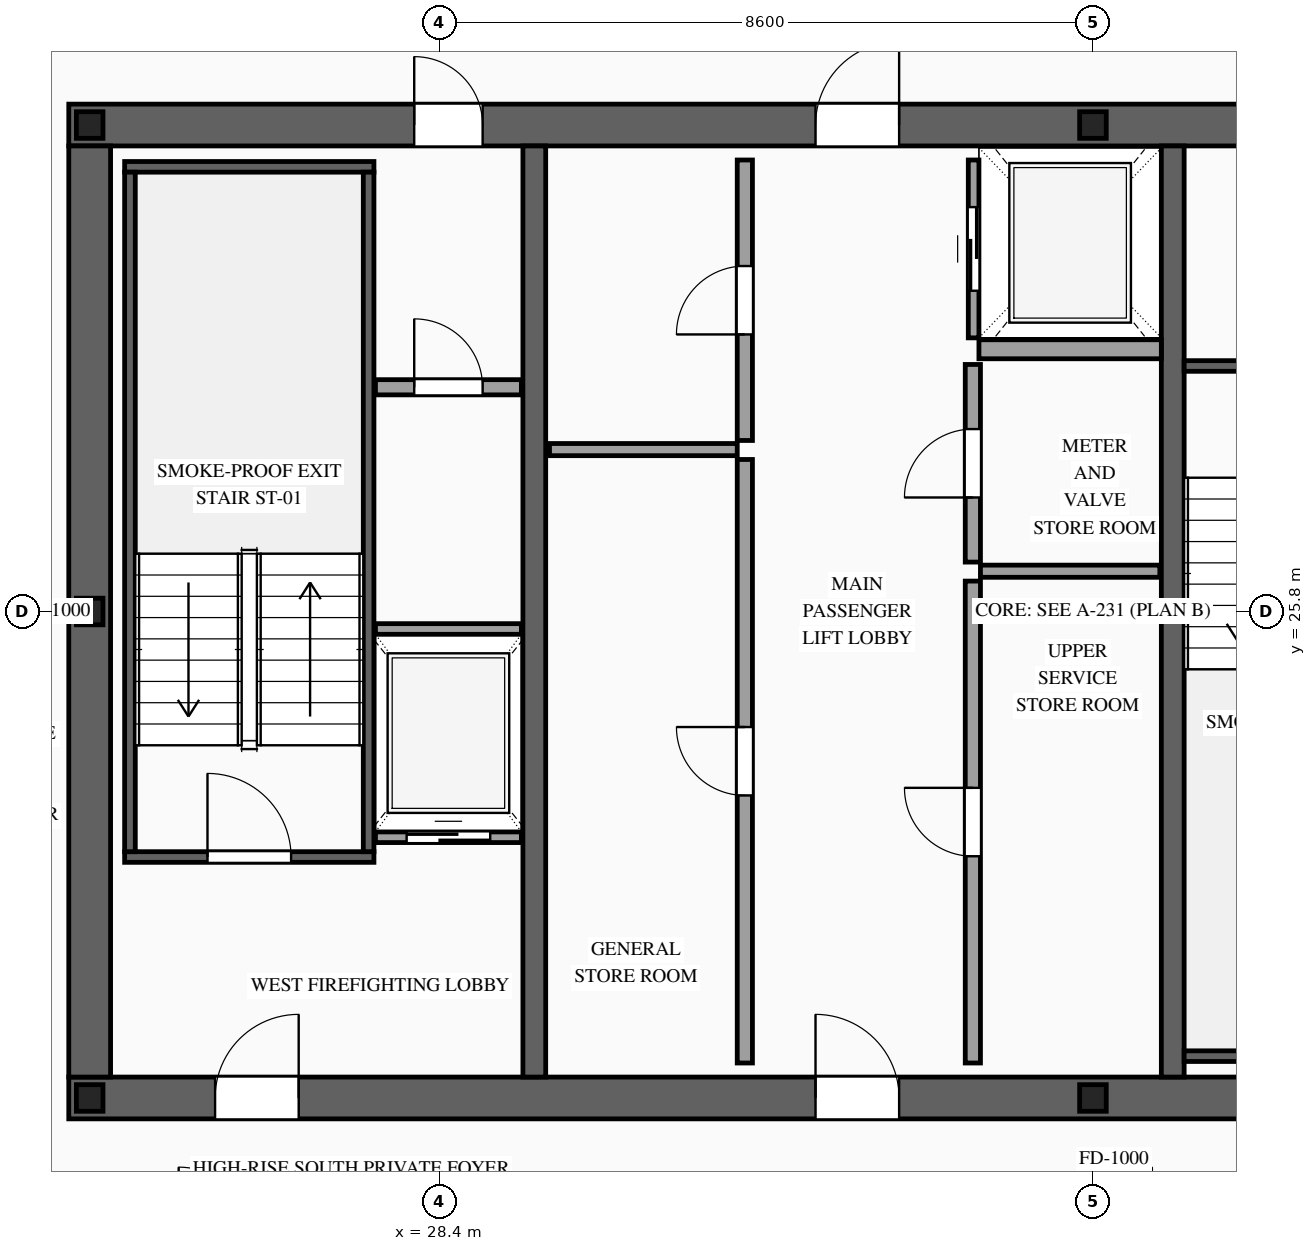
"""IFC4 building model, lengths in metres.
Left out: names, types, materials, properties, quantities, classifications, styles, units other than length and angle.
Written with IfcOpenShell. Run it as: python <this file> out.ifc"""

import sys

from ifc_helpers import new_model, si_unit, direction, frame, frame_2d, origin, origin_2d, place, context, subcontext, project, spatial, rectangle, i_section, extrude, source, transform, mapped, element, fill, save


model = new_model("IFC4")
c1 = context("Model", 3, precision=1e-05, world=origin(), true_north=direction((0.0, 1.0)))
c2 = subcontext(c1, "Body", "Model", "MODEL_VIEW")
j1 = project(units=[si_unit("LENGTHUNIT", "METRE"), si_unit("PLANEANGLEUNIT", "RADIAN")], contexts=[c1])
p1 = place(None, origin())
s1 = spatial("IfcSite", under=j1, at=p1, CompositionType="ELEMENT")
p2 = place(p1, origin())
s2 = spatial("IfcBuilding", under=s1, at=p2, CompositionType="ELEMENT")
p3 = place(p2, frame((0.0, 0.0, 271.6)))
s3 = spatial("IfcBuildingStorey", under=s2, at=p3, CompositionType="ELEMENT", Elevation=271.6)
p4 = place(p3, frame((23.525, 19.4, 0.0), z_axis=(0.0, 0.0, 1.0), x_axis=(1.0, 0.0, 0.0)))
e1 = element("IfcWall", 1, at=p4, inside=s3, PredefinedType="SHEAR", context=c2, shape_type="SweptSolid", body=[
    extrude(rectangle(XDim=26.95, YDim=0.55, at=frame_2d((13.475, 0.0))), origin(), (0.0, 0.0, 1.0), 3.5),
])
p5 = place(p4, frame((1.925, 0.0, 0.0)))
e2 = element("IfcOpeningElement", 2, at=p5, cuts=e1, PredefinedType="OPENING", context=c2, shape_type="SweptSolid", body=[
    extrude(rectangle(XDim=1.1, YDim=2.2, at=frame_2d((0.55, 1.1))), frame((0.0, 0.29, 0.0), z_axis=(0.0, -1.0, 0.0), x_axis=(1.0, 0.0, 0.0)), (0.0, 0.0, 1.0), 0.58),
])
p6 = place(p4, frame((9.825, 0.0, 0.0)))
e3 = element("IfcOpeningElement", 3, at=p6, cuts=e1, PredefinedType="OPENING", context=c2, shape_type="SweptSolid", body=[
    extrude(rectangle(XDim=1.1, YDim=2.2, at=frame_2d((0.55, 1.1))), frame((0.0, 0.29, 0.0), z_axis=(0.0, -1.0, 0.0), x_axis=(1.0, 0.0, 0.0)), (0.0, 0.0, 1.0), 0.58),
])
p7 = place(p4, frame((23.025, 0.0, 0.0)))
e4 = element("IfcOpeningElement", 4, at=p7, cuts=e1, PredefinedType="OPENING", context=c2, shape_type="SweptSolid", body=[
    extrude(rectangle(XDim=1.1, YDim=2.2, at=frame_2d((0.55, 1.1))), frame((0.0, 0.29, 0.0), z_axis=(0.0, -1.0, 0.0), x_axis=(1.0, 0.0, 0.0)), (0.0, 0.0, 1.0), 0.58),
])
p8 = place(p4, frame((19.645, 0.0, 0.0)))
e5 = element("IfcOpeningElement", 5, at=p8, cuts=e1, PredefinedType="OPENING", context=c2, shape_type="SweptSolid", body=[
    extrude(rectangle(XDim=0.9, YDim=2.15, at=frame_2d((0.45, 1.075))), frame((0.0, 0.29, 0.0), z_axis=(0.0, -1.0, 0.0), x_axis=(1.0, 0.0, 0.0)), (0.0, 0.0, 1.0), 0.58),
])
p9 = place(p4, frame((18.205, 0.0, 0.0)))
e6 = element("IfcOpeningElement", 6, at=p9, cuts=e1, PredefinedType="OPENING", context=c2, shape_type="SweptSolid", body=[
    extrude(rectangle(XDim=0.9, YDim=2.15, at=frame_2d((0.45, 1.075))), frame((0.0, 0.29, 0.0), z_axis=(0.0, -1.0, 0.0), x_axis=(1.0, 0.0, 0.0)), (0.0, 0.0, 1.0), 0.58),
])
p10 = place(p3, frame((23.525, 32.2, 0.0), z_axis=(0.0, 0.0, 1.0), x_axis=(1.0, 0.0, 0.0)))
e7 = element("IfcWall", 7, at=p10, inside=s3, PredefinedType="SHEAR", context=c2, shape_type="SweptSolid", body=[
    extrude(rectangle(XDim=26.95, YDim=0.55, at=frame_2d((13.475, 0.0))), origin(), (0.0, 0.0, 1.0), 3.5),
])
p11 = place(p10, frame((4.545, 0.0, 0.0)))
e8 = element("IfcOpeningElement", 8, at=p11, cuts=e7, PredefinedType="OPENING", context=c2, shape_type="SweptSolid", body=[
    extrude(rectangle(XDim=0.9, YDim=2.15, at=frame_2d((0.45, 1.075))), frame((0.0, 0.29, 0.0), z_axis=(0.0, -1.0, 0.0), x_axis=(1.0, 0.0, 0.0)), (0.0, 0.0, 1.0), 0.58),
])
p12 = place(p10, frame((9.825, 0.0, 0.0)))
e9 = element("IfcOpeningElement", 9, at=p12, cuts=e7, PredefinedType="OPENING", context=c2, shape_type="SweptSolid", body=[
    extrude(rectangle(XDim=1.1, YDim=2.2, at=frame_2d((0.55, 1.1))), frame((0.0, 0.29, 0.0), z_axis=(0.0, -1.0, 0.0), x_axis=(1.0, 0.0, 0.0)), (0.0, 0.0, 1.0), 0.58),
])
p13 = place(p10, frame((15.675, 0.0, 0.0)))
e10 = element("IfcOpeningElement", 10, at=p13, cuts=e7, PredefinedType="OPENING", context=c2, shape_type="SweptSolid", body=[
    extrude(rectangle(XDim=1.1, YDim=2.2, at=frame_2d((0.55, 1.1))), frame((0.0, 0.29, 0.0), z_axis=(0.0, -1.0, 0.0), x_axis=(1.0, 0.0, 0.0)), (0.0, 0.0, 1.0), 0.58),
])
p14 = place(p10, frame((18.775, 0.0, 0.0)))
e11 = element("IfcOpeningElement", 11, at=p14, cuts=e7, PredefinedType="OPENING", context=c2, shape_type="SweptSolid", body=[
    extrude(rectangle(XDim=1.1, YDim=2.2, at=frame_2d((0.55, 1.1))), frame((0.0, 0.29, 0.0), z_axis=(0.0, -1.0, 0.0), x_axis=(1.0, 0.0, 0.0)), (0.0, 0.0, 1.0), 0.58),
])
m1 = source(origin(), c2, "Body", "SweptSolid", [
    extrude(rectangle(XDim=12.25, YDim=0.55, at=frame_2d((6.125, 0.0))), origin(), (0.0, 0.0, 1.0), 3.5),
])
p15 = place(p3, frame((23.8, 19.675, 0.0), z_axis=(0.0, 0.0, 1.0), x_axis=(0.0, 1.0, 0.0)))
e12 = element("IfcWall", 12, at=p15, inside=s3, PredefinedType="SHEAR", context=c2, shape_type="MappedRepresentation", body=[
    mapped(m1, transform((0.0, 0.0, 0.0), scale=1.0)),
])
m2 = source(origin(), c2, "Body", "SweptSolid", [
    extrude(rectangle(XDim=12.25, YDim=0.3, at=frame_2d((6.125, 0.0))), origin(), (0.0, 0.0, 1.0), 3.5),
])
for number, where, z_axis, x_axis in (
    (13, (29.65, 19.675, 0.0), (0.0, 0.0, 1.0), (0.0, 1.0, 0.0)),
    (14, (38.05, 19.675, 0.0), (0.0, 0.0, 1.0), (0.0, 1.0, 0.0)),
):
    element("IfcWall", number, at=place(p3, frame(where, z_axis=z_axis, x_axis=x_axis)), inside=s3, PredefinedType="SOLIDWALL", context=c2, shape_type="MappedRepresentation", body=[
        mapped(m2, transform((0.0, 0.0, 0.0), scale=1.0)),
    ])
m3 = source(origin(), c2, "Body", "SweptSolid", [
    extrude(i_section(OverallWidth=0.35, OverallDepth=0.35, WebThickness=0.012, FlangeThickness=0.019, at=origin_2d()), origin(), (0.0, 0.0, 1.0), 3.5),
])
for number, where, z_axis, x_axis in (
    (15, (23.8, 19.4, 0.0), (0.0, 0.0, 1.0), (1.0, 0.0, 0.0)),
    (16, (37.0, 19.4, 0.0), (0.0, 0.0, 1.0), (1.0, 0.0, 0.0)),
    (17, (23.8, 25.8, 0.0), (0.0, 0.0, 1.0), (1.0, 0.0, 0.0)),
    (18, (23.8, 32.2, 0.0), (0.0, 0.0, 1.0), (1.0, 0.0, 0.0)),
    (19, (37.0, 32.2, 0.0), (0.0, 0.0, 1.0), (1.0, 0.0, 0.0)),
):
    element("IfcColumn", number, at=place(p3, frame(where, z_axis=z_axis, x_axis=x_axis)), inside=s3, PredefinedType="COLUMN", context=c2, shape_type="MappedRepresentation", body=[
        mapped(m3, transform((0.0, 0.0, 0.0), scale=1.0)),
    ])
p16 = place(p3, frame((27.56, 22.83, 0.0), z_axis=(0.0, 0.0, 1.0), x_axis=(1.0, 0.0, 0.0)))
e20 = element("IfcWall", 20, at=p16, inside=s3, PredefinedType="SOLIDWALL", context=c2, shape_type="SweptSolid", body=[
    extrude(rectangle(XDim=1.92, YDim=0.14, at=frame_2d((0.96, 0.0))), origin(), (0.0, 0.0, 1.0), 3.28),
])
p17 = place(p16, frame((0.41, 0.0, 0.0)))
e21 = element("IfcOpeningElement", 21, at=p17, cuts=e20, PredefinedType="OPENING", context=c2, shape_type="SweptSolid", body=[
    extrude(rectangle(XDim=1.1, YDim=2.2, at=frame_2d((0.55, 1.1))), frame((0.0, 0.085, 0.0), z_axis=(0.0, -1.0, 0.0), x_axis=(1.0, 0.0, 0.0)), (0.0, 0.0, 1.0), 0.17),
])
m4 = source(origin(), c2, "Body", "SweptSolid", [
    extrude(rectangle(XDim=1.92, YDim=0.14, at=frame_2d((0.96, 0.0))), origin(), (0.0, 0.0, 1.0), 3.28),
])
p18 = place(p3, frame((27.56, 25.57, 0.0), z_axis=(0.0, 0.0, 1.0), x_axis=(1.0, 0.0, 0.0)))
e22 = element("IfcWall", 22, at=p18, inside=s3, PredefinedType="SOLIDWALL", context=c2, shape_type="MappedRepresentation", body=[
    mapped(m4, transform((0.0, 0.0, 0.0), scale=1.0)),
])
p19 = place(p3, frame((35.43, 29.4, 0.0), z_axis=(0.0, 0.0, 1.0), x_axis=(0.0, 1.0, 0.0)))
e23 = element("IfcWall", 23, at=p19, inside=s3, PredefinedType="SOLIDWALL", context=c2, shape_type="SweptSolid", body=[
    extrude(rectangle(XDim=2.34, YDim=0.14, at=frame_2d((1.17, 0.0))), origin(), (0.0, 0.0, 1.0), 3.28),
])
p20 = place(p19, frame((0.62, 0.0, 0.0)))
e24 = element("IfcOpeningElement", 24, at=p20, cuts=e23, PredefinedType="OPENING", context=c2, shape_type="SweptSolid", body=[
    extrude(rectangle(XDim=1.1, YDim=2.2, at=frame_2d((0.55, 1.1))), frame((0.0, 0.085, 0.0), z_axis=(0.0, -1.0, 0.0), x_axis=(1.0, 0.0, 0.0)), (0.0, 0.0, 1.0), 0.17),
])
m5 = source(origin(), c2, "Body", "SweptSolid", [
    extrude(rectangle(XDim=2.4, YDim=0.25, at=frame_2d((1.2, 0.0))), origin(), (0.0, 0.0, 1.0), 3.28),
])
p21 = place(p3, frame((35.5, 29.25, 0.0), z_axis=(0.0, 0.0, 1.0), x_axis=(1.0, 0.0, 0.0)))
e25 = element("IfcWall", 25, at=p21, inside=s3, PredefinedType="SOLIDWALL", context=c2, shape_type="MappedRepresentation", body=[
    mapped(m5, transform((0.0, 0.0, 0.0), scale=1.0)),
])
p22 = place(p3, frame((24.26, 22.57, 0.0), z_axis=(0.0, 0.0, 1.0), x_axis=(1.0, 0.0, 0.0)))
e26 = element("IfcWall", 26, at=p22, inside=s3, PredefinedType="SOLIDWALL", context=c2, shape_type="SweptSolid", body=[
    extrude(rectangle(XDim=3.28, YDim=0.14, at=frame_2d((1.64, 0.0))), origin(), (0.0, 0.0, 1.0), 3.28),
])
p23 = place(p22, frame((1.09, 0.0, 0.0)))
e27 = element("IfcOpeningElement", 27, at=p23, cuts=e26, PredefinedType="OPENING", context=c2, shape_type="SweptSolid", body=[
    extrude(rectangle(XDim=1.1, YDim=2.2, at=frame_2d((0.55, 1.1))), frame((0.0, 0.085, 0.0), z_axis=(0.0, -1.0, 0.0), x_axis=(1.0, 0.0, 0.0)), (0.0, 0.0, 1.0), 0.17),
])
m6 = source(origin(), c2, "Body", "SweptSolid", [
    extrude(rectangle(XDim=3.28, YDim=0.14, at=frame_2d((1.64, 0.0))), origin(), (0.0, 0.0, 1.0), 3.28),
])
p24 = place(p3, frame((24.26, 31.65, 0.0), z_axis=(0.0, 0.0, 1.0), x_axis=(1.0, 0.0, 0.0)))
e28 = element("IfcWall", 28, at=p24, inside=s3, PredefinedType="SOLIDWALL", context=c2, shape_type="MappedRepresentation", body=[
    mapped(m6, transform((0.0, 0.0, 0.0), scale=1.0)),
])
m7 = source(origin(), c2, "Body", "SweptSolid", [
    extrude(rectangle(XDim=8.94, YDim=0.14, at=frame_2d((4.47, 0.0))), origin(), (0.0, 0.0, 1.0), 3.28),
])
for number, where, z_axis, x_axis in (
    (29, (24.33, 22.64, 0.0), (0.0, 0.0, 1.0), (0.0, 1.0, 0.0)),
    (30, (27.47, 22.64, 0.0), (0.0, 0.0, 1.0), (0.0, 1.0, 0.0)),
):
    element("IfcWall", number, at=place(p3, frame(where, z_axis=z_axis, x_axis=x_axis)), inside=s3, PredefinedType="SOLIDWALL", context=c2, shape_type="MappedRepresentation", body=[
        mapped(m7, transform((0.0, 0.0, 0.0), scale=1.0)),
    ])
p25 = place(p3, frame((38.2, 29.03, 0.0), z_axis=(0.0, 0.0, 1.0), x_axis=(1.0, 0.0, 0.0)))
e31 = element("IfcWall", 31, at=p25, inside=s3, PredefinedType="SOLIDWALL", context=c2, shape_type="SweptSolid", body=[
    extrude(rectangle(XDim=3.14, YDim=0.14, at=frame_2d((1.57, 0.0))), origin(), (0.0, 0.0, 1.0), 3.28),
])
p26 = place(p25, frame((1.02, 0.0, 0.0)))
e32 = element("IfcOpeningElement", 32, at=p26, cuts=e31, PredefinedType="OPENING", context=c2, shape_type="SweptSolid", body=[
    extrude(rectangle(XDim=1.1, YDim=2.2, at=frame_2d((0.55, 1.1))), frame((0.0, 0.085, 0.0), z_axis=(0.0, -1.0, 0.0), x_axis=(1.0, 0.0, 0.0)), (0.0, 0.0, 1.0), 0.17),
])
m8 = source(origin(), c2, "Body", "SweptSolid", [
    extrude(rectangle(XDim=3.14, YDim=0.14, at=frame_2d((1.57, 0.0))), origin(), (0.0, 0.0, 1.0), 3.28),
])
p27 = place(p3, frame((38.2, 19.95, 0.0), z_axis=(0.0, 0.0, 1.0), x_axis=(1.0, 0.0, 0.0)))
e33 = element("IfcWall", 33, at=p27, inside=s3, PredefinedType="SOLIDWALL", context=c2, shape_type="MappedRepresentation", body=[
    mapped(m8, transform((0.0, 0.0, 0.0), scale=1.0)),
])
p28 = place(p3, frame((27.56, 28.75, 0.0), z_axis=(0.0, 0.0, 1.0), x_axis=(1.0, 0.0, 0.0)))
e34 = element("IfcWall", 34, at=p28, inside=s3, PredefinedType="PARTITIONING", context=c2, shape_type="SweptSolid", body=[
    extrude(rectangle(XDim=1.92, YDim=0.2, at=frame_2d((0.96, 0.0))), origin(), (0.0, 0.0, 1.0), 3.28),
])
p29 = place(p28, frame((0.51, 0.0, 0.0)))
e35 = element("IfcOpeningElement", 35, at=p29, cuts=e34, PredefinedType="OPENING", context=c2, shape_type="SweptSolid", body=[
    extrude(rectangle(XDim=0.9, YDim=2.15, at=frame_2d((0.45, 1.075))), frame((0.0, 0.115, 0.0), z_axis=(0.0, -1.0, 0.0), x_axis=(1.0, 0.0, 0.0)), (0.0, 0.0, 1.0), 0.23),
])
p30 = place(p3, frame((32.42, 19.86, 0.0), z_axis=(0.0, 0.0, 1.0), x_axis=(0.0, 1.0, 0.0)))
e36 = element("IfcWall", 36, at=p30, inside=s3, PredefinedType="PARTITIONING", context=c2, shape_type="SweptSolid", body=[
    extrude(rectangle(XDim=7.94, YDim=0.2, at=frame_2d((3.97, 0.0))), origin(), (0.0, 0.0, 1.0), 3.28),
])
p31 = place(p30, frame((3.52, 0.0, 0.0)))
e37 = element("IfcOpeningElement", 37, at=p31, cuts=e36, PredefinedType="OPENING", context=c2, shape_type="SweptSolid", body=[
    extrude(rectangle(XDim=0.9, YDim=2.15, at=frame_2d((0.45, 1.075))), frame((0.0, 0.115, 0.0), z_axis=(0.0, -1.0, 0.0), x_axis=(1.0, 0.0, 0.0)), (0.0, 0.0, 1.0), 0.23),
])
p32 = place(p3, frame((32.42, 28.05, 0.0), z_axis=(0.0, 0.0, 1.0), x_axis=(0.0, 1.0, 0.0)))
e38 = element("IfcWall", 38, at=p32, inside=s3, PredefinedType="PARTITIONING", context=c2, shape_type="SweptSolid", body=[
    extrude(rectangle(XDim=3.69, YDim=0.2, at=frame_2d((1.845, 0.0))), origin(), (0.0, 0.0, 1.0), 3.28),
])
p33 = place(p32, frame((1.395, 0.0, 0.0)))
e39 = element("IfcOpeningElement", 39, at=p33, cuts=e38, PredefinedType="OPENING", context=c2, shape_type="SweptSolid", body=[
    extrude(rectangle(XDim=0.9, YDim=2.15, at=frame_2d((0.45, 1.075))), frame((0.0, 0.115, 0.0), z_axis=(0.0, -1.0, 0.0), x_axis=(1.0, 0.0, 0.0)), (0.0, 0.0, 1.0), 0.23),
])
m9 = source(origin(), c2, "Body", "SweptSolid", [
    extrude(rectangle(XDim=2.47, YDim=0.16, at=frame_2d((1.235, 0.0))), origin(), (0.0, 0.0, 1.0), 3.28),
])
p34 = place(p3, frame((29.85, 27.93, 0.0), z_axis=(0.0, 0.0, 1.0), x_axis=(1.0, 0.0, 0.0)))
e40 = element("IfcWall", 40, at=p34, inside=s3, PredefinedType="PARTITIONING", context=c2, shape_type="MappedRepresentation", body=[
    mapped(m9, transform((0.0, 0.0, 0.0), scale=1.0)),
])
p35 = place(p3, frame((35.42, 19.86, 0.0), z_axis=(0.0, 0.0, 1.0), x_axis=(0.0, 1.0, 0.0)))
e41 = element("IfcWall", 41, at=p35, inside=s3, PredefinedType="PARTITIONING", context=c2, shape_type="SweptSolid", body=[
    extrude(rectangle(XDim=6.34, YDim=0.2, at=frame_2d((3.17, 0.0))), origin(), (0.0, 0.0, 1.0), 3.28),
])
p36 = place(p35, frame((2.72, 0.0, 0.0)))
e42 = element("IfcOpeningElement", 42, at=p36, cuts=e41, PredefinedType="OPENING", context=c2, shape_type="SweptSolid", body=[
    extrude(rectangle(XDim=0.9, YDim=2.15, at=frame_2d((0.45, 1.075))), frame((0.0, 0.115, 0.0), z_axis=(0.0, -1.0, 0.0), x_axis=(1.0, 0.0, 0.0)), (0.0, 0.0, 1.0), 0.23),
])
p37 = place(p3, frame((35.42, 26.45, 0.0), z_axis=(0.0, 0.0, 1.0), x_axis=(0.0, 1.0, 0.0)))
e43 = element("IfcWall", 43, at=p37, inside=s3, PredefinedType="PARTITIONING", context=c2, shape_type="SweptSolid", body=[
    extrude(rectangle(XDim=2.6, YDim=0.2, at=frame_2d((1.3, 0.0))), origin(), (0.0, 0.0, 1.0), 3.28),
])
p38 = place(p37, frame((0.85, 0.0, 0.0)))
e44 = element("IfcOpeningElement", 44, at=p38, cuts=e43, PredefinedType="OPENING", context=c2, shape_type="SweptSolid", body=[
    extrude(rectangle(XDim=0.9, YDim=2.15, at=frame_2d((0.45, 1.075))), frame((0.0, 0.115, 0.0), z_axis=(0.0, -1.0, 0.0), x_axis=(1.0, 0.0, 0.0)), (0.0, 0.0, 1.0), 0.23),
])
m10 = source(origin(), c2, "Body", "SweptSolid", [
    extrude(rectangle(XDim=2.36, YDim=0.16, at=frame_2d((1.18, 0.0))), origin(), (0.0, 0.0, 1.0), 3.28),
])
p39 = place(p3, frame((35.52, 26.33, 0.0), z_axis=(0.0, 0.0, 1.0), x_axis=(1.0, 0.0, 0.0)))
e45 = element("IfcWall", 45, at=p39, inside=s3, PredefinedType="PARTITIONING", context=c2, shape_type="MappedRepresentation", body=[
    mapped(m10, transform((0.0, 0.0, 0.0), scale=1.0)),
])
m11 = source(origin(), c2, "Body", "SweptSolid", [
    extrude(rectangle(XDim=1.1, YDim=2.2, at=frame_2d((0.55, 1.1))), frame((0.0, 0.025, 0.0), z_axis=(0.0, -1.0, 0.0), x_axis=(1.0, 0.0, 0.0)), (0.0, 0.0, 1.0), 0.05),
])
p40 = place(p17, origin())
e46 = element("IfcDoor", 46, at=p40, inside=s3, OperationType="SLIDING_TO_LEFT", PredefinedType="DOOR", context=c2, shape_type="MappedRepresentation", body=[
    mapped(m11, transform((0.0, 0.0, 0.0), scale=1.0)),
])
fill(e21, e46)
p41 = place(p20, origin())
e47 = element("IfcDoor", 47, at=p41, inside=s3, OperationType="SLIDING_TO_RIGHT", PredefinedType="DOOR", context=c2, shape_type="MappedRepresentation", body=[
    mapped(m11, transform((0.0, 0.0, 0.0), scale=1.0)),
])
fill(e24, e47)
m12 = source(origin(), c2, "Body", "SweptSolid", [
    extrude(rectangle(XDim=1.1, YDim=2.2, at=frame_2d((0.55, 1.1))), frame((0.0, 0.025, 0.0), z_axis=(0.0, -1.0, 0.0), x_axis=(1.0, 0.0, 0.0)), (0.0, 0.0, 1.0), 0.05),
])
p42 = place(p23, origin())
e48 = element("IfcDoor", 48, at=p42, inside=s3, OperationType="SINGLE_SWING_LEFT", PredefinedType="DOOR", context=c2, shape_type="MappedRepresentation", body=[
    mapped(m12, transform((0.0, 0.0, 0.0), scale=1.0)),
])
fill(e27, e48)
p43 = place(p5, origin())
e49 = element("IfcDoor", 49, at=p43, inside=s3, OperationType="SINGLE_SWING_RIGHT", PredefinedType="DOOR", context=c2, shape_type="MappedRepresentation", body=[
    mapped(m12, transform((0.0, 0.0, 0.0), scale=1.0)),
])
fill(e2, e49)
p44 = place(p6, origin())
e50 = element("IfcDoor", 50, at=p44, inside=s3, OperationType="SINGLE_SWING_LEFT", PredefinedType="DOOR", context=c2, shape_type="MappedRepresentation", body=[
    mapped(m12, transform((0.0, 0.0, 0.0), scale=1.0)),
])
fill(e3, e50)
m13 = source(origin(), c2, "Body", "SweptSolid", [
    extrude(rectangle(XDim=0.9, YDim=2.15, at=frame_2d((0.45, 1.075))), frame((0.0, 0.025, 0.0), z_axis=(0.0, -1.0, 0.0), x_axis=(1.0, 0.0, 0.0)), (0.0, 0.0, 1.0), 0.05),
])
p45 = place(p11, origin())
e51 = element("IfcDoor", 51, at=p45, inside=s3, OperationType="SINGLE_SWING_LEFT", PredefinedType="DOOR", context=c2, shape_type="MappedRepresentation", body=[
    mapped(m13, transform((0.0, 0.0, 0.0), scale=1.0)),
])
fill(e8, e51)
p46 = place(p12, origin())
e52 = element("IfcDoor", 52, at=p46, inside=s3, OperationType="SINGLE_SWING_RIGHT", PredefinedType="DOOR", context=c2, shape_type="MappedRepresentation", body=[
    mapped(m12, transform((0.0, 0.0, 0.0), scale=1.0)),
])
fill(e9, e52)
p47 = place(p29, origin())
e53 = element("IfcDoor", 53, at=p47, inside=s3, OperationType="SINGLE_SWING_LEFT", PredefinedType="DOOR", context=c2, shape_type="MappedRepresentation", body=[
    mapped(m13, transform((0.0, 0.0, 0.0), scale=1.0)),
])
fill(e35, e53)
p48 = place(p31, origin())
e54 = element("IfcDoor", 54, at=p48, inside=s3, OperationType="SINGLE_SWING_RIGHT", PredefinedType="DOOR", context=c2, shape_type="MappedRepresentation", body=[
    mapped(m13, transform((0.0, 0.0, 0.0), scale=1.0)),
])
fill(e37, e54)
p49 = place(p33, origin())
e55 = element("IfcDoor", 55, at=p49, inside=s3, OperationType="SINGLE_SWING_LEFT", PredefinedType="DOOR", context=c2, shape_type="MappedRepresentation", body=[
    mapped(m13, transform((0.0, 0.0, 0.0), scale=1.0)),
])
fill(e39, e55)
p50 = place(p36, origin())
e56 = element("IfcDoor", 56, at=p50, inside=s3, OperationType="SINGLE_SWING_RIGHT", PredefinedType="DOOR", context=c2, shape_type="MappedRepresentation", body=[
    mapped(m13, transform((0.0, 0.0, 0.0), scale=1.0)),
])
fill(e42, e56)
p51 = place(p38, origin())
e57 = element("IfcDoor", 57, at=p51, inside=s3, OperationType="SINGLE_SWING_LEFT", PredefinedType="DOOR", context=c2, shape_type="MappedRepresentation", body=[
    mapped(m13, transform((0.0, 0.0, 0.0), scale=1.0)),
])
fill(e44, e57)
save(model, sys.argv[1])
